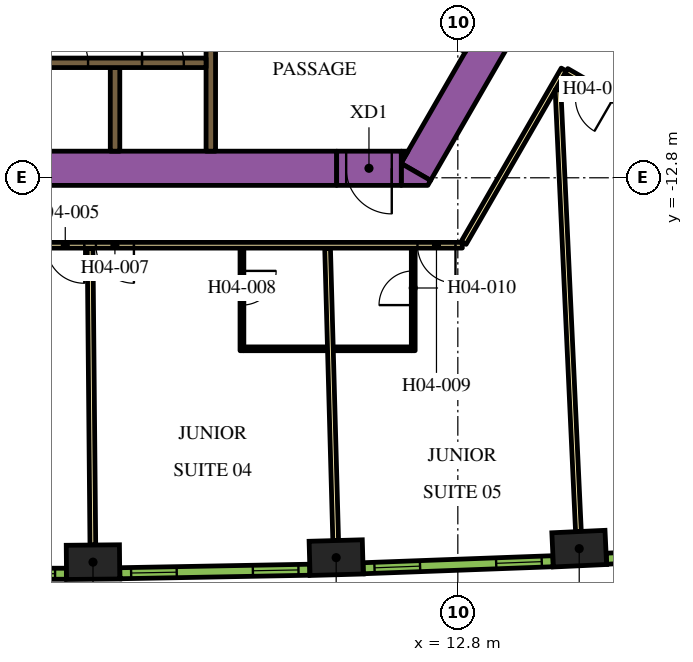
"""IFC4 building model, lengths in metres.
Left out: names, types, materials, properties, quantities, classifications, styles, units other than length and angle.
Written with IfcOpenShell. Run it as: python <this file> out.ifc"""

import sys

from ifc_helpers import new_model, si_unit, direction, frame, frame_2d, origin, origin_2d, place, context, subcontext, project, spatial, polyline, rectangle, outline, extrude, element, fill, save


model = new_model("IFC4")
c1 = context("Model", 3, precision=1e-05, world=origin(), true_north=direction((0.0, 1.0)))
c2 = subcontext(c1, "Body", "Model", "MODEL_VIEW")
j1 = project(units=[si_unit("LENGTHUNIT", "METRE"), si_unit("PLANEANGLEUNIT", "RADIAN")], contexts=[c1])
p1 = place(None, origin())
s1 = spatial("IfcSite", under=j1, at=p1, CompositionType="ELEMENT")
p2 = place(p1, origin())
s2 = spatial("IfcBuilding", under=s1, at=p2, CompositionType="ELEMENT")
p3 = place(p2, frame((0.0, 0.0, 66.6)))
s3 = spatial("IfcBuildingStorey", under=s2, at=p3, CompositionType="ELEMENT", Elevation=66.6)
for number, where, z_axis, x_axis in (
    (1, (3.2, -22.913, 0.0), (0.0, 0.0, 1.0), (1.0, 0.009, 0.0)),
    (2, (9.599, -22.795, 0.0), (0.0, 0.0, 1.0), (1.0, 0.028, 0.0)),
    (3, (15.994, -22.558, 0.0), (0.0, 0.0, 1.0), (0.999, 0.046, 0.0)),
):
    element("IfcColumn", number, at=place(p3, frame(where, z_axis=z_axis, x_axis=x_axis)), inside=s3, PredefinedType="COLUMN", context=c2, shape_type="SweptSolid", body=[
        extrude(rectangle(XDim=1.4, YDim=0.9, at=origin_2d()), origin(), (0.0, 0.0, 1.0), 3.9),
    ])
p4 = place(p3, frame((11.695, -12.644, 0.0), z_axis=(0.0, 0.0, 1.0), x_axis=(0.500010229568, 0.86601949766, 0.0)))
e4 = element("IfcWall", 4, at=p4, inside=s3, PredefinedType="SOLIDWALL", context=c2, shape_type="SweptSolid", body=[
    extrude(rectangle(XDim=9.326, YDim=0.9, at=frame_2d((4.663, 0.0))), origin(), (0.0, 0.0, 1.0), 3.9),
])
p5 = place(p3, origin())
e5 = element("IfcWall", 5, at=p5, inside=s3, PredefinedType="SOLIDWALL", context=c2, shape_type="SweptSolid", body=[
    extrude(outline(polyline([(12.009, -13.0), (11.312, -13.0), (11.312, -12.425), (12.083, -12.871), (12.009, -13.0)])), origin(), (0.0, 0.0, 1.0), 3.9),
])
e6 = element("IfcWall", 6, at=p5, inside=s3, PredefinedType="SOLIDWALL", context=c2, shape_type="SweptSolid", body=[
    extrude(outline(polyline([(11.489, -12.1), (11.312, -12.407), (11.312, -12.1), (11.489, -12.1)])), origin(), (0.0, 0.0, 1.0), 3.9),
])
p6 = place(p3, frame((-12.019, -12.55, 0.0), z_axis=(0.0, 0.0, 1.0), x_axis=(1.0, 0.0, 0.0)))
e7 = element("IfcWall", 7, at=p6, inside=s3, PredefinedType="SOLIDWALL", context=c2, shape_type="SweptSolid", body=[
    extrude(rectangle(XDim=21.63, YDim=0.9, at=frame_2d((10.815, 0.0))), origin(), (0.0, 0.0, 1.0), 3.9),
])
p7 = place(p3, frame((6.3, -12.1, 0.0), z_axis=(0.0, 0.0, 1.0), x_axis=(0.0, 1.0, 0.0)))
e8 = element("IfcWall", 8, at=p7, inside=s3, PredefinedType="SOLIDWALL", context=c2, shape_type="SweptSolid", body=[
    extrude(rectangle(XDim=3.428, YDim=0.25, at=frame_2d((1.714, 0.0))), origin(), (0.0, 0.0, 1.0), 3.9),
])
p8 = place(p3, frame((3.78, -12.1, 0.0), z_axis=(0.0, 0.0, 1.0), x_axis=(0.0, 1.0, 0.0)))
e9 = element("IfcWall", 9, at=p8, inside=s3, PredefinedType="SOLIDWALL", context=c2, shape_type="SweptSolid", body=[
    extrude(rectangle(XDim=2.2, YDim=0.25, at=frame_2d((1.1, 0.0))), origin(), (0.0, 0.0, 1.0), 3.9),
])
p9 = place(p3, frame((-6.175, -9.775, 0.0), z_axis=(0.0, 0.0, 1.0), x_axis=(1.0, 0.0, 0.0)))
e10 = element("IfcWall", 10, at=p9, inside=s3, PredefinedType="SOLIDWALL", context=c2, shape_type="SweptSolid", body=[
    extrude(rectangle(XDim=12.35, YDim=0.25, at=frame_2d((6.175, 0.0))), origin(), (0.0, 0.0, 1.0), 3.9),
])
p10 = place(p9, frame((0.585, 0.0, 0.0)))
e11 = element("IfcOpeningElement", 11, at=p10, cuts=e10, PredefinedType="OPENING", context=c2, shape_type="SweptSolid", body=[
    extrude(rectangle(XDim=1.1, YDim=2.1, at=frame_2d((0.55, 1.05))), frame((0.0, 0.135, 0.0), z_axis=(0.0, -1.0, 0.0), x_axis=(1.0, 0.0, 0.0)), (0.0, 0.0, 1.0), 0.27),
])
p11 = place(p9, frame((3.105, 0.0, 0.0)))
e12 = element("IfcOpeningElement", 12, at=p11, cuts=e10, PredefinedType="OPENING", context=c2, shape_type="SweptSolid", body=[
    extrude(rectangle(XDim=1.1, YDim=2.1, at=frame_2d((0.55, 1.05))), frame((0.0, 0.135, 0.0), z_axis=(0.0, -1.0, 0.0), x_axis=(1.0, 0.0, 0.0)), (0.0, 0.0, 1.0), 0.27),
])
p12 = place(p9, frame((5.625, 0.0, 0.0)))
e13 = element("IfcOpeningElement", 13, at=p12, cuts=e10, PredefinedType="OPENING", context=c2, shape_type="SweptSolid", body=[
    extrude(rectangle(XDim=1.1, YDim=2.1, at=frame_2d((0.55, 1.05))), frame((0.0, 0.135, 0.0), z_axis=(0.0, -1.0, 0.0), x_axis=(1.0, 0.0, 0.0)), (0.0, 0.0, 1.0), 0.27),
])
p13 = place(p9, frame((8.145, 0.0, 0.0)))
e14 = element("IfcOpeningElement", 14, at=p13, cuts=e10, PredefinedType="OPENING", context=c2, shape_type="SweptSolid", body=[
    extrude(rectangle(XDim=1.1, YDim=2.1, at=frame_2d((0.55, 1.05))), frame((0.0, 0.135, 0.0), z_axis=(0.0, -1.0, 0.0), x_axis=(1.0, 0.0, 0.0)), (0.0, 0.0, 1.0), 0.27),
])
p14 = place(p9, frame((10.665, 0.0, 0.0)))
e15 = element("IfcOpeningElement", 15, at=p14, cuts=e10, PredefinedType="OPENING", context=c2, shape_type="SweptSolid", body=[
    extrude(rectangle(XDim=1.1, YDim=2.1, at=frame_2d((0.55, 1.05))), frame((0.0, 0.135, 0.0), z_axis=(0.0, -1.0, 0.0), x_axis=(1.0, 0.0, 0.0)), (0.0, 0.0, 1.0), 0.27),
])
p15 = place(p3, frame((11.312, -12.55, 0.0), z_axis=(0.0, 0.0, 1.0), x_axis=(-1.0, 0.0, 0.0)))
e16 = element("IfcWall", 16, at=p15, inside=s3, PredefinedType="SOLIDWALL", context=c2, shape_type="SweptSolid", body=[
    extrude(rectangle(XDim=1.7, YDim=0.9, at=frame_2d((0.85, 0.0))), origin(), (0.0, 0.0, 1.0), 3.9),
])
p16 = place(p15, frame((0.25, 0.0, 0.0)))
e17 = element("IfcOpeningElement", 17, at=p16, cuts=e16, PredefinedType="OPENING", context=c2, shape_type="SweptSolid", body=[
    extrude(rectangle(XDim=1.2, YDim=2.1, at=frame_2d((0.6, 1.05))), frame((0.0, 0.46, 0.0), z_axis=(0.0, -1.0, 0.0), x_axis=(1.0, 0.0, 0.0)), (0.0, 0.0, 1.0), 0.92),
])
p17 = place(p3, frame((16.412, -8.523, 0.0), z_axis=(0.0, 0.0, 1.0), x_axis=(0.866022197818, -0.500005552856, 0.0)))
e18 = element("IfcWall", 18, at=p17, inside=s3, PredefinedType="PARTITIONING", context=c2, shape_type="SweptSolid", body=[
    extrude(rectangle(XDim=16.224, YDim=0.15, at=frame_2d((8.112, 0.0))), origin(), (0.0, 0.0, 1.0), 2.75),
])
p18 = place(p17, frame((4.223, 0.0, 0.0)))
e19 = element("IfcOpeningElement", 19, at=p18, cuts=e18, PredefinedType="OPENING", context=c2, shape_type="SweptSolid", body=[
    extrude(rectangle(XDim=1.0, YDim=2.1, at=frame_2d((0.5, 1.05))), frame((0.0, 0.085, 0.0), z_axis=(0.0, -1.0, 0.0), x_axis=(1.0, 0.0, 0.0)), (0.0, 0.0, 1.0), 0.17),
])
p19 = place(p3, frame((12.918, -14.575, 0.0), z_axis=(0.0, 0.0, 1.0), x_axis=(-1.0, 0.0, 0.0)))
e20 = element("IfcWall", 20, at=p19, inside=s3, PredefinedType="PARTITIONING", context=c2, shape_type="SweptSolid", body=[
    extrude(rectangle(XDim=25.766, YDim=0.15, at=frame_2d((12.883, 0.0))), origin(), (0.0, 0.0, 1.0), 2.75),
])
p20 = place(p19, frame((24.586, 0.0, 0.0)))
e21 = element("IfcOpeningElement", 21, at=p20, cuts=e20, PredefinedType="OPENING", context=c2, shape_type="SweptSolid", body=[
    extrude(rectangle(XDim=1.0, YDim=2.1, at=frame_2d((0.5, 1.05))), frame((0.0, 0.085, 0.0), z_axis=(0.0, -1.0, 0.0), x_axis=(1.0, 0.0, 0.0)), (0.0, 0.0, 1.0), 0.17),
])
p21 = place(p19, frame((9.948, 0.0, 0.0)))
e22 = element("IfcOpeningElement", 22, at=p21, cuts=e20, PredefinedType="OPENING", context=c2, shape_type="SweptSolid", body=[
    extrude(rectangle(XDim=1.0, YDim=2.1, at=frame_2d((0.5, 1.05))), frame((0.0, 0.085, 0.0), z_axis=(0.0, -1.0, 0.0), x_axis=(1.0, 0.0, 0.0)), (0.0, 0.0, 1.0), 0.17),
])
p22 = place(p19, frame((8.642, 0.0, 0.0)))
e23 = element("IfcOpeningElement", 23, at=p22, cuts=e20, PredefinedType="OPENING", context=c2, shape_type="SweptSolid", body=[
    extrude(rectangle(XDim=1.0, YDim=2.1, at=frame_2d((0.5, 1.05))), frame((0.0, 0.085, 0.0), z_axis=(0.0, -1.0, 0.0), x_axis=(1.0, 0.0, 0.0)), (0.0, 0.0, 1.0), 0.17),
])
p23 = place(p19, frame((0.18, 0.0, 0.0)))
e24 = element("IfcOpeningElement", 24, at=p23, cuts=e20, PredefinedType="OPENING", context=c2, shape_type="SweptSolid", body=[
    extrude(rectangle(XDim=1.0, YDim=2.1, at=frame_2d((0.5, 1.05))), frame((0.0, 0.085, 0.0), z_axis=(0.0, -1.0, 0.0), x_axis=(1.0, 0.0, 0.0)), (0.0, 0.0, 1.0), 0.17),
])
p24 = place(p3, frame((15.587, -9.952, 0.0), z_axis=(0.0, 0.0, 1.0), x_axis=(-0.500016618951, -0.866015808616, 0.0)))
e25 = element("IfcWall", 25, at=p24, inside=s3, PredefinedType="PARTITIONING", context=c2, shape_type="SweptSolid", body=[
    extrude(rectangle(XDim=5.268, YDim=0.15, at=frame_2d((2.634, 0.0))), origin(), (0.0, 0.0, 1.0), 2.75),
])
p25 = place(p3, frame((29.638, -18.064, 0.0), z_axis=(0.0, 0.0, 1.0), x_axis=(-0.866026175601, 0.499998663172, 0.0)))
e26 = element("IfcWall", 26, at=p25, inside=s3, PredefinedType="PARTITIONING", context=c2, shape_type="SweptSolid", body=[
    extrude(rectangle(XDim=16.144, YDim=0.15, at=frame_2d((8.072, 0.0))), origin(), (0.0, 0.0, 1.0), 2.75),
])
p26 = place(p25, frame((14.714, 0.0, 0.0)))
e27 = element("IfcOpeningElement", 27, at=p26, cuts=e26, PredefinedType="OPENING", context=c2, shape_type="SweptSolid", body=[
    extrude(rectangle(XDim=1.0, YDim=2.1, at=frame_2d((0.5, 1.05))), frame((0.0, 0.085, 0.0), z_axis=(0.0, -1.0, 0.0), x_axis=(1.0, 0.0, 0.0)), (0.0, 0.0, 1.0), 0.17),
])
p27 = place(p25, frame((7.275, 0.0, 0.0)))
e28 = element("IfcOpeningElement", 28, at=p27, cuts=e26, PredefinedType="OPENING", context=c2, shape_type="SweptSolid", body=[
    extrude(rectangle(XDim=1.0, YDim=2.1, at=frame_2d((0.5, 1.05))), frame((0.0, 0.085, 0.0), z_axis=(0.0, -1.0, 0.0), x_axis=(1.0, 0.0, 0.0)), (0.0, 0.0, 1.0), 0.17),
])
p28 = place(p3, frame((3.196, -22.463, 0.0), z_axis=(0.0, 0.0, 1.0), x_axis=(-0.00926060032, 0.999957119721, 0.0)))
e29 = element("IfcWall", 29, at=p28, inside=s3, PredefinedType="PARTITIONING", context=c2, shape_type="SweptSolid", body=[
    extrude(rectangle(XDim=7.803, YDim=0.15, at=frame_2d((3.902, 0.0))), origin(), (0.0, 0.0, 1.0), 2.75),
])
p29 = place(p3, frame((9.586, -22.345, 0.0), z_axis=(0.0, 0.0, 1.0), x_axis=(-0.027722115646, 0.999615668297, 0.0)))
e30 = element("IfcWall", 30, at=p29, inside=s3, PredefinedType="PARTITIONING", context=c2, shape_type="SweptSolid", body=[
    extrude(rectangle(XDim=7.688, YDim=0.15, at=frame_2d((3.844, 0.0))), origin(), (0.0, 0.0, 1.0), 2.75),
])
p30 = place(p3, frame((15.973, -22.109, 0.0), z_axis=(0.0, 0.0, 1.0), x_axis=(-0.046191717129, 0.998932592955, 0.0)))
e31 = element("IfcWall", 31, at=p30, inside=s3, PredefinedType="PARTITIONING", context=c2, shape_type="SweptSolid", body=[
    extrude(rectangle(XDim=11.638, YDim=0.15, at=frame_2d((5.819, 0.0))), origin(), (0.0, 0.0, 1.0), 2.75),
])
p31 = place(p3, frame((7.119, -14.65, 0.0), z_axis=(0.0, 0.0, 1.0), x_axis=(0.0, -1.0, 0.0)))
e32 = element("IfcWall", 32, at=p31, inside=s3, PredefinedType="PARTITIONING", context=c2, shape_type="SweptSolid", body=[
    extrude(rectangle(XDim=2.7, YDim=0.1, at=frame_2d((1.35, 0.0))), origin(), (0.0, 0.0, 1.0), 2.75),
])
p32 = place(p31, frame((0.6, 0.0, 0.0)))
e33 = element("IfcOpeningElement", 33, at=p32, cuts=e32, PredefinedType="OPENING", context=c2, shape_type="SweptSolid", body=[
    extrude(rectangle(XDim=0.9, YDim=2.1, at=frame_2d((0.45, 1.05))), frame((0.0, 0.06, 0.0), z_axis=(0.0, -1.0, 0.0), x_axis=(1.0, 0.0, 0.0)), (0.0, 0.0, 1.0), 0.12),
])
p33 = place(p3, frame((7.169, -17.3, 0.0), z_axis=(0.0, 0.0, 1.0), x_axis=(1.0, 0.0, 0.0)))
e34 = element("IfcWall", 34, at=p33, inside=s3, PredefinedType="PARTITIONING", context=c2, shape_type="SweptSolid", body=[
    extrude(rectangle(XDim=2.2, YDim=0.1, at=frame_2d((1.1, 0.0))), origin(), (0.0, 0.0, 1.0), 2.75),
])
p34 = place(p3, frame((11.627, -17.35, 0.0), z_axis=(0.0, 0.0, 1.0), x_axis=(0.0, 1.0, 0.0)))
e35 = element("IfcWall", 35, at=p34, inside=s3, PredefinedType="PARTITIONING", context=c2, shape_type="SweptSolid", body=[
    extrude(rectangle(XDim=2.7, YDim=0.1, at=frame_2d((1.35, 0.0))), origin(), (0.0, 0.0, 1.0), 2.75),
])
p35 = place(p34, frame((1.2, 0.0, 0.0)))
e36 = element("IfcOpeningElement", 36, at=p35, cuts=e35, PredefinedType="OPENING", context=c2, shape_type="SweptSolid", body=[
    extrude(rectangle(XDim=0.9, YDim=2.1, at=frame_2d((0.45, 1.05))), frame((0.0, 0.06, 0.0), z_axis=(0.0, -1.0, 0.0), x_axis=(1.0, 0.0, 0.0)), (0.0, 0.0, 1.0), 0.12),
])
p36 = place(p3, frame((11.577, -17.3, 0.0), z_axis=(0.0, 0.0, 1.0), x_axis=(-1.0, 0.0, 0.0)))
e37 = element("IfcWall", 37, at=p36, inside=s3, PredefinedType="PARTITIONING", context=c2, shape_type="SweptSolid", body=[
    extrude(rectangle(XDim=2.05, YDim=0.1, at=frame_2d((1.025, 0.0))), origin(), (0.0, 0.0, 1.0), 2.75),
])
p37 = place(p3, frame((-2.499, -23.218, 0.0), z_axis=(0.0, 0.0, 1.0), x_axis=(1.0, 0.0, 0.0)))
e38 = element("IfcWall", 38, at=p37, inside=s3, PredefinedType="SOLIDWALL", context=c2, shape_type="SweptSolid", body=[
    extrude(rectangle(XDim=4.998, YDim=0.29, at=frame_2d((2.499, 0.0))), origin(), (0.0, 0.0, 1.0), 3.65),
])
p38 = place(p37, frame((0.297, 0.0, 0.9)))
e39 = element("IfcOpeningElement", 39, at=p38, cuts=e38, PredefinedType="OPENING", context=c2, shape_type="SweptSolid", body=[
    extrude(rectangle(XDim=1.2, YDim=2.15, at=frame_2d((0.6, 1.075))), frame((0.0, 0.155, 0.0), z_axis=(0.0, -1.0, 0.0), x_axis=(1.0, 0.0, 0.0)), (0.0, 0.0, 1.0), 0.31),
])
p39 = place(p37, frame((3.501, 0.0, 0.9)))
e40 = element("IfcOpeningElement", 40, at=p39, cuts=e38, PredefinedType="OPENING", context=c2, shape_type="SweptSolid", body=[
    extrude(rectangle(XDim=1.2, YDim=2.15, at=frame_2d((0.6, 1.075))), frame((0.0, 0.155, 0.0), z_axis=(0.0, -1.0, 0.0), x_axis=(1.0, 0.0, 0.0)), (0.0, 0.0, 1.0), 0.31),
])
p40 = place(p3, frame((3.906, -23.205, 0.0), z_axis=(0.0, 0.0, 1.0), x_axis=(0.999829529479, 0.018463801951, 0.0)))
e41 = element("IfcWall", 41, at=p40, inside=s3, PredefinedType="SOLIDWALL", context=c2, shape_type="SweptSolid", body=[
    extrude(rectangle(XDim=4.998, YDim=0.29, at=frame_2d((2.499, 0.0))), origin(), (0.0, 0.0, 1.0), 3.65),
])
p41 = place(p40, frame((0.297, 0.0, 0.9)))
e42 = element("IfcOpeningElement", 42, at=p41, cuts=e41, PredefinedType="OPENING", context=c2, shape_type="SweptSolid", body=[
    extrude(rectangle(XDim=1.2, YDim=2.15, at=frame_2d((0.6, 1.075))), frame((0.0, 0.155, 0.0), z_axis=(0.0, -1.0, 0.0), x_axis=(1.0, 0.0, 0.0)), (0.0, 0.0, 1.0), 0.31),
])
p42 = place(p40, frame((3.501, 0.0, 0.9)))
e43 = element("IfcOpeningElement", 43, at=p42, cuts=e41, PredefinedType="OPENING", context=c2, shape_type="SweptSolid", body=[
    extrude(rectangle(XDim=1.2, YDim=2.15, at=frame_2d((0.6, 1.075))), frame((0.0, 0.155, 0.0), z_axis=(0.0, -1.0, 0.0), x_axis=(1.0, 0.0, 0.0)), (0.0, 0.0, 1.0), 0.31),
])
p43 = place(p3, frame((10.31, -23.074, 0.0), z_axis=(0.0, 0.0, 1.0), x_axis=(0.999317974969, 0.036926750529, 0.0)))
e44 = element("IfcWall", 44, at=p43, inside=s3, PredefinedType="SOLIDWALL", context=c2, shape_type="SweptSolid", body=[
    extrude(rectangle(XDim=4.998, YDim=0.29, at=frame_2d((2.499, 0.0))), origin(), (0.0, 0.0, 1.0), 3.65),
])
p44 = place(p43, frame((0.297, 0.0, 0.9)))
e45 = element("IfcOpeningElement", 45, at=p44, cuts=e44, PredefinedType="OPENING", context=c2, shape_type="SweptSolid", body=[
    extrude(rectangle(XDim=1.2, YDim=2.15, at=frame_2d((0.6, 1.075))), frame((0.0, 0.155, 0.0), z_axis=(0.0, -1.0, 0.0), x_axis=(1.0, 0.0, 0.0)), (0.0, 0.0, 1.0), 0.31),
])
p45 = place(p43, frame((3.501, 0.0, 0.9)))
e46 = element("IfcOpeningElement", 46, at=p45, cuts=e44, PredefinedType="OPENING", context=c2, shape_type="SweptSolid", body=[
    extrude(rectangle(XDim=1.2, YDim=2.15, at=frame_2d((0.6, 1.075))), frame((0.0, 0.155, 0.0), z_axis=(0.0, -1.0, 0.0), x_axis=(1.0, 0.0, 0.0)), (0.0, 0.0, 1.0), 0.31),
])
p46 = place(p3, frame((16.711, -22.824, 0.0), z_axis=(0.0, 0.0, 1.0), x_axis=(0.998464708705, 0.055391564976, 0.0)))
e47 = element("IfcWall", 47, at=p46, inside=s3, PredefinedType="SOLIDWALL", context=c2, shape_type="SweptSolid", body=[
    extrude(rectangle(XDim=4.998, YDim=0.29, at=frame_2d((2.499, 0.0))), origin(), (0.0, 0.0, 1.0), 3.65),
])
p47 = place(p46, frame((0.297, 0.0, 0.9)))
e48 = element("IfcOpeningElement", 48, at=p47, cuts=e47, PredefinedType="OPENING", context=c2, shape_type="SweptSolid", body=[
    extrude(rectangle(XDim=1.2, YDim=2.15, at=frame_2d((0.6, 1.075))), frame((0.0, 0.155, 0.0), z_axis=(0.0, -1.0, 0.0), x_axis=(1.0, 0.0, 0.0)), (0.0, 0.0, 1.0), 0.31),
])
p48 = place(p46, frame((3.501, 0.0, 0.9)))
e49 = element("IfcOpeningElement", 49, at=p48, cuts=e47, PredefinedType="OPENING", context=c2, shape_type="SweptSolid", body=[
    extrude(rectangle(XDim=1.2, YDim=2.15, at=frame_2d((0.6, 1.075))), frame((0.0, 0.155, 0.0), z_axis=(0.0, -1.0, 0.0), x_axis=(1.0, 0.0, 0.0)), (0.0, 0.0, 1.0), 0.31),
])
p49 = place(p13, origin())
e50 = element("IfcDoor", 50, at=p49, inside=s3, OperationType="DOUBLE_DOOR_SLIDING", PredefinedType="DOOR", context=c2, shape_type="SweptSolid", body=[
    extrude(rectangle(XDim=1.1, YDim=2.1, at=frame_2d((0.55, 1.05))), frame((0.0, 0.025, 0.0), z_axis=(0.0, -1.0, 0.0), x_axis=(1.0, 0.0, 0.0)), (0.0, 0.0, 1.0), 0.05),
])
fill(e14, e50)
p50 = place(p14, origin())
e51 = element("IfcDoor", 51, at=p50, inside=s3, OperationType="DOUBLE_DOOR_SLIDING", PredefinedType="DOOR", context=c2, shape_type="SweptSolid", body=[
    extrude(rectangle(XDim=1.1, YDim=2.1, at=frame_2d((0.55, 1.05))), frame((0.0, 0.025, 0.0), z_axis=(0.0, -1.0, 0.0), x_axis=(1.0, 0.0, 0.0)), (0.0, 0.0, 1.0), 0.05),
])
fill(e15, e51)
p51 = place(p16, origin())
e52 = element("IfcDoor", 52, at=p51, inside=s3, OperationType="SINGLE_SWING_LEFT", PredefinedType="DOOR", context=c2, shape_type="SweptSolid", body=[
    extrude(rectangle(XDim=1.2, YDim=2.1, at=frame_2d((0.6, 1.05))), frame((0.0, 0.025, 0.0), z_axis=(0.0, -1.0, 0.0), x_axis=(1.0, 0.0, 0.0)), (0.0, 0.0, 1.0), 0.05),
])
fill(e17, e52)
p52 = place(p21, origin())
e53 = element("IfcDoor", 53, at=p52, inside=s3, OperationType="SINGLE_SWING_LEFT", PredefinedType="DOOR", context=c2, shape_type="SweptSolid", body=[
    extrude(rectangle(XDim=1.0, YDim=2.1, at=frame_2d((0.5, 1.05))), frame((0.0, 0.025, 0.0), z_axis=(0.0, -1.0, 0.0), x_axis=(1.0, 0.0, 0.0)), (0.0, 0.0, 1.0), 0.05),
])
fill(e22, e53)
p53 = place(p22, origin())
e54 = element("IfcDoor", 54, at=p53, inside=s3, OperationType="SINGLE_SWING_RIGHT", PredefinedType="DOOR", context=c2, shape_type="SweptSolid", body=[
    extrude(rectangle(XDim=1.0, YDim=2.1, at=frame_2d((0.5, 1.05))), frame((0.0, 0.025, 0.0), z_axis=(0.0, -1.0, 0.0), x_axis=(1.0, 0.0, 0.0)), (0.0, 0.0, 1.0), 0.05),
])
fill(e23, e54)
p54 = place(p32, origin())
e55 = element("IfcDoor", 55, at=p54, inside=s3, OperationType="SINGLE_SWING_LEFT", PredefinedType="DOOR", context=c2, shape_type="SweptSolid", body=[
    extrude(rectangle(XDim=0.9, YDim=2.1, at=frame_2d((0.45, 1.05))), frame((0.0, 0.025, 0.0), z_axis=(0.0, -1.0, 0.0), x_axis=(1.0, 0.0, 0.0)), (0.0, 0.0, 1.0), 0.05),
])
fill(e33, e55)
p55 = place(p23, origin())
e56 = element("IfcDoor", 56, at=p55, inside=s3, OperationType="SINGLE_SWING_LEFT", PredefinedType="DOOR", context=c2, shape_type="SweptSolid", body=[
    extrude(rectangle(XDim=1.0, YDim=2.1, at=frame_2d((0.5, 1.05))), frame((0.0, 0.025, 0.0), z_axis=(0.0, -1.0, 0.0), x_axis=(1.0, 0.0, 0.0)), (0.0, 0.0, 1.0), 0.05),
])
fill(e24, e56)
p56 = place(p35, origin())
e57 = element("IfcDoor", 57, at=p56, inside=s3, OperationType="SINGLE_SWING_LEFT", PredefinedType="DOOR", context=c2, shape_type="SweptSolid", body=[
    extrude(rectangle(XDim=0.9, YDim=2.1, at=frame_2d((0.45, 1.05))), frame((0.0, 0.025, 0.0), z_axis=(0.0, -1.0, 0.0), x_axis=(1.0, 0.0, 0.0)), (0.0, 0.0, 1.0), 0.05),
])
fill(e36, e57)
p57 = place(p26, origin())
e58 = element("IfcDoor", 58, at=p57, inside=s3, OperationType="SINGLE_SWING_RIGHT", PredefinedType="DOOR", context=c2, shape_type="SweptSolid", body=[
    extrude(rectangle(XDim=1.0, YDim=2.1, at=frame_2d((0.5, 1.05))), frame((0.0, 0.025, 0.0), z_axis=(0.0, -1.0, 0.0), x_axis=(1.0, 0.0, 0.0)), (0.0, 0.0, 1.0), 0.05),
])
fill(e27, e58)
p58 = place(p39, origin())
e59 = element("IfcWindow", 59, at=p58, inside=s3, PartitioningType="DOUBLE_PANEL_VERTICAL", PredefinedType="WINDOW", context=c2, shape_type="SweptSolid", body=[
    extrude(rectangle(XDim=1.2, YDim=2.15, at=frame_2d((0.6, 1.075))), frame((0.0, 0.015, 0.0), z_axis=(0.0, -1.0, 0.0), x_axis=(1.0, 0.0, 0.0)), (0.0, 0.0, 1.0), 0.06),
])
fill(e40, e59)
p59 = place(p41, origin())
e60 = element("IfcWindow", 60, at=p59, inside=s3, PartitioningType="DOUBLE_PANEL_VERTICAL", PredefinedType="WINDOW", context=c2, shape_type="SweptSolid", body=[
    extrude(rectangle(XDim=1.2, YDim=2.15, at=frame_2d((0.6, 1.075))), frame((0.0, 0.015, 0.0), z_axis=(0.0, -1.0, 0.0), x_axis=(1.0, 0.0, 0.0)), (0.0, 0.0, 1.0), 0.06),
])
fill(e42, e60)
p60 = place(p42, origin())
e61 = element("IfcWindow", 61, at=p60, inside=s3, PartitioningType="DOUBLE_PANEL_VERTICAL", PredefinedType="WINDOW", context=c2, shape_type="SweptSolid", body=[
    extrude(rectangle(XDim=1.2, YDim=2.15, at=frame_2d((0.6, 1.075))), frame((0.0, 0.015, 0.0), z_axis=(0.0, -1.0, 0.0), x_axis=(1.0, 0.0, 0.0)), (0.0, 0.0, 1.0), 0.06),
])
fill(e43, e61)
p61 = place(p44, origin())
e62 = element("IfcWindow", 62, at=p61, inside=s3, PartitioningType="DOUBLE_PANEL_VERTICAL", PredefinedType="WINDOW", context=c2, shape_type="SweptSolid", body=[
    extrude(rectangle(XDim=1.2, YDim=2.15, at=frame_2d((0.6, 1.075))), frame((0.0, 0.015, 0.0), z_axis=(0.0, -1.0, 0.0), x_axis=(1.0, 0.0, 0.0)), (0.0, 0.0, 1.0), 0.06),
])
fill(e45, e62)
p62 = place(p45, origin())
e63 = element("IfcWindow", 63, at=p62, inside=s3, PartitioningType="DOUBLE_PANEL_VERTICAL", PredefinedType="WINDOW", context=c2, shape_type="SweptSolid", body=[
    extrude(rectangle(XDim=1.2, YDim=2.15, at=frame_2d((0.6, 1.075))), frame((0.0, 0.015, 0.0), z_axis=(0.0, -1.0, 0.0), x_axis=(1.0, 0.0, 0.0)), (0.0, 0.0, 1.0), 0.06),
])
fill(e46, e63)
save(model, sys.argv[1])
